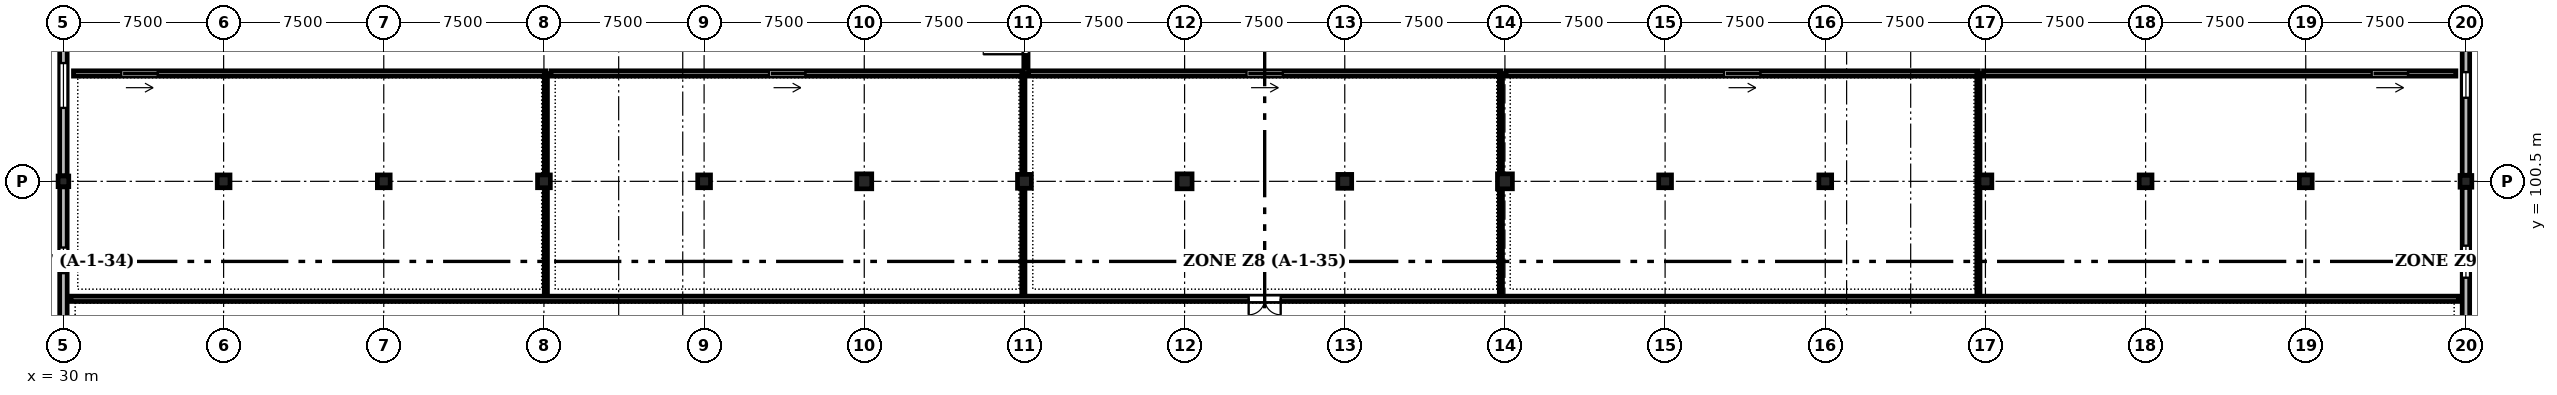
"""IFC4 building model, lengths in metres.
Left out: names, types, materials, properties, quantities, classifications, styles, units other than length and angle.
Written with IfcOpenShell. Run it as: python <this file> out.ifc"""

import sys

from ifc_helpers import new_model, si_unit, direction, frame, frame_2d, origin, origin_2d, place, context, subcontext, project, spatial, rectangle, circle, extrude, element, fill, save


model = new_model("IFC4")
c1 = context("Model", 3, precision=1e-05, world=origin(), true_north=direction((0.0, 1.0)))
c2 = subcontext(c1, "Body", "Model", "MODEL_VIEW")
j1 = project(units=[si_unit("LENGTHUNIT", "METRE"), si_unit("PLANEANGLEUNIT", "RADIAN")], contexts=[c1])
p1 = place(None, origin())
s1 = spatial("IfcSite", under=j1, at=p1, CompositionType="ELEMENT")
p2 = place(p1, origin())
s2 = spatial("IfcBuilding", under=s1, at=p2, CompositionType="ELEMENT")
p3 = place(p2, frame((0.0, 0.0, 9.3)))
s3 = spatial("IfcBuildingStorey", under=s2, at=p3, CompositionType="ELEMENT", Elevation=9.3)
p4 = place(p3, frame((30.0, 100.5, 0.0), z_axis=(0.0, 0.0, 1.0), x_axis=(1.0, 0.0, 0.0)))
e1 = element("IfcColumn", 1, at=p4, inside=s3, PredefinedType="COLUMN", context=c2, shape_type="SweptSolid", body=[
    extrude(rectangle(XDim=0.5, YDim=0.5, at=origin_2d()), origin(), (0.0, 0.0, 1.0), 4.8),
])
p5 = place(p3, frame((37.5, 100.5, 0.0), z_axis=(0.0, 0.0, 1.0), x_axis=(1.0, 0.0, 0.0)))
e2 = element("IfcColumn", 2, at=p5, inside=s3, PredefinedType="COLUMN", context=c2, shape_type="SweptSolid", body=[
    extrude(circle(Radius=0.3, at=origin_2d()), origin(), (0.0, 0.0, 1.0), 4.8),
])
for number, where, z_axis, x_axis in (
    (3, (45.0, 100.5, 0.0), (0.0, 0.0, 1.0), (1.0, 0.0, 0.0)),
    (4, (52.5, 100.5, 0.0), (0.0, 0.0, 1.0), (1.0, 0.0, 0.0)),
):
    element("IfcColumn", number, at=place(p3, frame(where, z_axis=z_axis, x_axis=x_axis)), inside=s3, PredefinedType="COLUMN", context=c2, shape_type="SweptSolid", body=[
        extrude(rectangle(XDim=0.6, YDim=0.6, at=origin_2d()), origin(), (0.0, 0.0, 1.0), 4.8),
    ])
p6 = place(p3, frame((60.0, 100.5, 0.0), z_axis=(0.0, 0.0, 1.0), x_axis=(1.0, 0.0, 0.0)))
e5 = element("IfcColumn", 5, at=p6, inside=s3, PredefinedType="COLUMN", context=c2, shape_type="SweptSolid", body=[
    extrude(circle(Radius=0.3, at=origin_2d()), origin(), (0.0, 0.0, 1.0), 4.8),
])
p7 = place(p3, frame((67.5, 100.5, 0.0), z_axis=(0.0, 0.0, 1.0), x_axis=(1.0, 0.0, 0.0)))
e6 = element("IfcColumn", 6, at=p7, inside=s3, PredefinedType="COLUMN", context=c2, shape_type="SweptSolid", body=[
    extrude(rectangle(XDim=0.7, YDim=0.7, at=origin_2d()), origin(), (0.0, 0.0, 1.0), 4.8),
])
p8 = place(p3, frame((75.0, 100.5, 0.0), z_axis=(0.0, 0.0, 1.0), x_axis=(1.0, 0.0, 0.0)))
e7 = element("IfcColumn", 7, at=p8, inside=s3, PredefinedType="COLUMN", context=c2, shape_type="SweptSolid", body=[
    extrude(rectangle(XDim=0.65, YDim=0.65, at=origin_2d()), origin(), (0.0, 0.0, 1.0), 4.8),
])
p9 = place(p3, frame((82.5, 100.5, 0.0), z_axis=(0.0, 0.0, 1.0), x_axis=(1.0, 0.0, 0.0)))
e8 = element("IfcColumn", 8, at=p9, inside=s3, PredefinedType="COLUMN", context=c2, shape_type="SweptSolid", body=[
    extrude(rectangle(XDim=0.7, YDim=0.7, at=origin_2d()), origin(), (0.0, 0.0, 1.0), 4.8),
])
p10 = place(p3, frame((90.0, 100.5, 0.0), z_axis=(0.0, 0.0, 1.0), x_axis=(1.0, 0.0, 0.0)))
e9 = element("IfcColumn", 9, at=p10, inside=s3, PredefinedType="COLUMN", context=c2, shape_type="SweptSolid", body=[
    extrude(rectangle(XDim=0.65, YDim=0.65, at=origin_2d()), origin(), (0.0, 0.0, 1.0), 4.8),
])
p11 = place(p3, frame((97.5, 100.5, 0.0), z_axis=(0.0, 0.0, 1.0), x_axis=(1.0, 0.0, 0.0)))
e10 = element("IfcColumn", 10, at=p11, inside=s3, PredefinedType="COLUMN", context=c2, shape_type="SweptSolid", body=[
    extrude(rectangle(XDim=0.7, YDim=0.7, at=origin_2d()), origin(), (0.0, 0.0, 1.0), 4.8),
])
p12 = place(p3, frame((105.0, 100.5, 0.0), z_axis=(0.0, 0.0, 1.0), x_axis=(1.0, 0.0, 0.0)))
e11 = element("IfcColumn", 11, at=p12, inside=s3, PredefinedType="COLUMN", context=c2, shape_type="SweptSolid", body=[
    extrude(circle(Radius=0.3, at=origin_2d()), origin(), (0.0, 0.0, 1.0), 4.8),
])
for number, where, z_axis, x_axis in (
    (12, (112.5, 100.5, 0.0), (0.0, 0.0, 1.0), (1.0, 0.0, 0.0)),
    (13, (120.0, 100.5, 0.0), (0.0, 0.0, 1.0), (1.0, 0.0, 0.0)),
):
    element("IfcColumn", number, at=place(p3, frame(where, z_axis=z_axis, x_axis=x_axis)), inside=s3, PredefinedType="COLUMN", context=c2, shape_type="SweptSolid", body=[
        extrude(rectangle(XDim=0.6, YDim=0.6, at=origin_2d()), origin(), (0.0, 0.0, 1.0), 4.8),
    ])
p13 = place(p3, frame((127.5, 100.5, 0.0), z_axis=(0.0, 0.0, 1.0), x_axis=(1.0, 0.0, 0.0)))
e14 = element("IfcColumn", 14, at=p13, inside=s3, PredefinedType="COLUMN", context=c2, shape_type="SweptSolid", body=[
    extrude(circle(Radius=0.3, at=origin_2d()), origin(), (0.0, 0.0, 1.0), 4.8),
])
p14 = place(p3, frame((135.0, 100.5, 0.0), z_axis=(0.0, 0.0, 1.0), x_axis=(1.0, 0.0, 0.0)))
e15 = element("IfcColumn", 15, at=p14, inside=s3, PredefinedType="COLUMN", context=c2, shape_type="SweptSolid", body=[
    extrude(rectangle(XDim=0.6, YDim=0.6, at=origin_2d()), origin(), (0.0, 0.0, 1.0), 4.8),
])
p15 = place(p3, frame((142.5, 100.5, 0.0), z_axis=(0.0, 0.0, 1.0), x_axis=(1.0, 0.0, 0.0)))
e16 = element("IfcColumn", 16, at=p15, inside=s3, PredefinedType="COLUMN", context=c2, shape_type="SweptSolid", body=[
    extrude(rectangle(XDim=0.55, YDim=0.55, at=origin_2d()), origin(), (0.0, 0.0, 1.0), 4.8),
])
p16 = place(p3, frame((30.0, 93.36, 0.0), z_axis=(0.0, 0.0, 1.0), x_axis=(0.0, 1.0, 0.0)))
e17 = element("IfcWall", 17, at=p16, inside=s3, PredefinedType="STANDARD", context=c2, shape_type="SweptSolid", body=[
    extrude(rectangle(XDim=6.88, YDim=0.35, at=frame_2d((3.44, 0.0))), origin(), (0.0, 0.0, 1.0), 3.95),
])
p17 = place(p16, frame((2.84, 0.0, 0.9)))
e18 = element("IfcOpeningElement", 18, at=p17, cuts=e17, PredefinedType="OPENING", context=c2, shape_type="SweptSolid", body=[
    extrude(rectangle(XDim=1.2, YDim=2.1, at=frame_2d((0.6, 1.05))), frame((0.0, 0.185, 0.0), z_axis=(0.0, -1.0, 0.0), x_axis=(1.0, 0.0, 0.0)), (0.0, 0.0, 1.0), 0.37),
])
p18 = place(p3, frame((30.0, 100.76, 0.0), z_axis=(0.0, 0.0, 1.0), x_axis=(0.0, 1.0, 0.0)))
e19 = element("IfcWall", 19, at=p18, inside=s3, PredefinedType="STANDARD", context=c2, shape_type="SweptSolid", body=[
    extrude(rectangle(XDim=8.455, YDim=0.35, at=frame_2d((4.228, 0.0))), origin(), (0.0, 0.0, 1.0), 4.0),
])
p19 = place(p18, frame((3.177, 0.0, 0.9)))
e20 = element("IfcOpeningElement", 20, at=p19, cuts=e19, PredefinedType="OPENING", context=c2, shape_type="SweptSolid", body=[
    extrude(rectangle(XDim=2.1, YDim=2.1, at=frame_2d((1.05, 1.05))), frame((0.0, 0.185, 0.0), z_axis=(0.0, -1.0, 0.0), x_axis=(1.0, 0.0, 0.0)), (0.0, 0.0, 1.0), 0.37),
])
p20 = place(p3, frame((142.5, 100.215, 0.0), z_axis=(0.0, 0.0, 1.0), x_axis=(0.0, -1.0, 0.0)))
e21 = element("IfcWall", 21, at=p20, inside=s3, PredefinedType="STANDARD", context=c2, shape_type="SweptSolid", body=[
    extrude(rectangle(XDim=6.955, YDim=0.35, at=frame_2d((3.478, 0.0))), origin(), (0.0, 0.0, 1.0), 3.95),
])
p21 = place(p20, frame((2.728, 0.0, 0.9)))
e22 = element("IfcOpeningElement", 22, at=p21, cuts=e21, PredefinedType="OPENING", context=c2, shape_type="SweptSolid", body=[
    extrude(rectangle(XDim=1.5, YDim=2.1, at=frame_2d((0.75, 1.05))), frame((0.0, 0.185, 0.0), z_axis=(0.0, -1.0, 0.0), x_axis=(1.0, 0.0, 0.0)), (0.0, 0.0, 1.0), 0.37),
])
p22 = place(p3, frame((142.5, 109.24, 0.0), z_axis=(0.0, 0.0, 1.0), x_axis=(0.0, -1.0, 0.0)))
e23 = element("IfcWall", 23, at=p22, inside=s3, PredefinedType="STANDARD", context=c2, shape_type="SweptSolid", body=[
    extrude(rectangle(XDim=8.455, YDim=0.35, at=frame_2d((4.228, 0.0))), origin(), (0.0, 0.0, 1.0), 4.0),
])
p23 = place(p22, frame((3.627, 0.0, 0.9)))
e24 = element("IfcOpeningElement", 24, at=p23, cuts=e23, PredefinedType="OPENING", context=c2, shape_type="SweptSolid", body=[
    extrude(rectangle(XDim=1.2, YDim=2.1, at=frame_2d((0.6, 1.05))), frame((0.0, 0.185, 0.0), z_axis=(0.0, -1.0, 0.0), x_axis=(1.0, 0.0, 0.0)), (0.0, 0.0, 1.0), 0.37),
])
p24 = place(p3, frame((142.15, 95.0, 0.0), z_axis=(0.0, 0.0, 1.0), x_axis=(-1.0, 0.0, 0.0)))
e25 = element("IfcWall", 25, at=p24, inside=s3, PredefinedType="STANDARD", context=c2, shape_type="SweptSolid", body=[
    extrude(rectangle(XDim=111.8, YDim=0.25, at=frame_2d((55.9, 0.0))), origin(), (0.0, 0.0, 1.0), 4.535),
])
p25 = place(p24, frame((55.15, 0.0, 0.0)))
e26 = element("IfcOpeningElement", 26, at=p25, cuts=e25, PredefinedType="OPENING", context=c2, shape_type="SweptSolid", body=[
    extrude(rectangle(XDim=1.5, YDim=2.3, at=frame_2d((0.75, 1.15))), frame((0.0, 0.135, 0.0), z_axis=(0.0, -1.0, 0.0), x_axis=(1.0, 0.0, 0.0)), (0.0, 0.0, 1.0), 0.27),
])
p26 = place(p3, frame((52.59, 105.55, 0.0), z_axis=(0.0, 0.0, 1.0), x_axis=(-1.0, 0.0, 0.0)))
e27 = element("IfcWall", 27, at=p26, inside=s3, PredefinedType="STANDARD", context=c2, shape_type="SweptSolid", body=[
    extrude(rectangle(XDim=22.12, YDim=0.25, at=frame_2d((11.06, 0.0))), origin(), (0.0, 0.0, 1.0), 4.535),
])
p27 = place(p26, frame((18.178, 0.0, 0.0)))
e28 = element("IfcOpeningElement", 28, at=p27, cuts=e27, PredefinedType="OPENING", context=c2, shape_type="SweptSolid", body=[
    extrude(rectangle(XDim=1.7, YDim=2.4, at=frame_2d((0.85, 1.2))), frame((0.0, 0.135, 0.0), z_axis=(0.0, -1.0, 0.0), x_axis=(1.0, 0.0, 0.0)), (0.0, 0.0, 1.0), 0.27),
])
p28 = place(p3, frame((74.95, 105.55, 0.0), z_axis=(0.0, 0.0, 1.0), x_axis=(-1.0, 0.0, 0.0)))
e29 = element("IfcWall", 29, at=p28, inside=s3, PredefinedType="STANDARD", context=c2, shape_type="SweptSolid", body=[
    extrude(rectangle(XDim=22.12, YDim=0.25, at=frame_2d((11.06, 0.0))), origin(), (0.0, 0.0, 1.0), 4.535),
])
p29 = place(p28, frame((10.21, 0.0, 0.0)))
e30 = element("IfcOpeningElement", 30, at=p29, cuts=e29, PredefinedType="OPENING", context=c2, shape_type="SweptSolid", body=[
    extrude(rectangle(XDim=1.7, YDim=2.4, at=frame_2d((0.85, 1.2))), frame((0.0, 0.135, 0.0), z_axis=(0.0, -1.0, 0.0), x_axis=(1.0, 0.0, 0.0)), (0.0, 0.0, 1.0), 0.27),
])
p30 = place(p3, frame((97.31, 105.55, 0.0), z_axis=(0.0, 0.0, 1.0), x_axis=(-1.0, 0.0, 0.0)))
e31 = element("IfcWall", 31, at=p30, inside=s3, PredefinedType="STANDARD", context=c2, shape_type="SweptSolid", body=[
    extrude(rectangle(XDim=22.12, YDim=0.25, at=frame_2d((11.06, 0.0))), origin(), (0.0, 0.0, 1.0), 4.535),
])
p31 = place(p30, frame((10.21, 0.0, 0.0)))
e32 = element("IfcOpeningElement", 32, at=p31, cuts=e31, PredefinedType="OPENING", context=c2, shape_type="SweptSolid", body=[
    extrude(rectangle(XDim=1.7, YDim=2.4, at=frame_2d((0.85, 1.2))), frame((0.0, 0.135, 0.0), z_axis=(0.0, -1.0, 0.0), x_axis=(1.0, 0.0, 0.0)), (0.0, 0.0, 1.0), 0.27),
])
p32 = place(p3, frame((119.67, 105.55, 0.0), z_axis=(0.0, 0.0, 1.0), x_axis=(-1.0, 0.0, 0.0)))
e33 = element("IfcWall", 33, at=p32, inside=s3, PredefinedType="STANDARD", context=c2, shape_type="SweptSolid", body=[
    extrude(rectangle(XDim=22.12, YDim=0.25, at=frame_2d((11.06, 0.0))), origin(), (0.0, 0.0, 1.0), 4.535),
])
p33 = place(p32, frame((10.21, 0.0, 0.0)))
e34 = element("IfcOpeningElement", 34, at=p33, cuts=e33, PredefinedType="OPENING", context=c2, shape_type="SweptSolid", body=[
    extrude(rectangle(XDim=1.7, YDim=2.4, at=frame_2d((0.85, 1.2))), frame((0.0, 0.135, 0.0), z_axis=(0.0, -1.0, 0.0), x_axis=(1.0, 0.0, 0.0)), (0.0, 0.0, 1.0), 0.27),
])
p34 = place(p3, frame((142.03, 105.55, 0.0), z_axis=(0.0, 0.0, 1.0), x_axis=(-1.0, 0.0, 0.0)))
e35 = element("IfcWall", 35, at=p34, inside=s3, PredefinedType="STANDARD", context=c2, shape_type="SweptSolid", body=[
    extrude(rectangle(XDim=22.12, YDim=0.25, at=frame_2d((11.06, 0.0))), origin(), (0.0, 0.0, 1.0), 4.535),
])
p35 = place(p34, frame((2.242, 0.0, 0.0)))
e36 = element("IfcOpeningElement", 36, at=p35, cuts=e35, PredefinedType="OPENING", context=c2, shape_type="SweptSolid", body=[
    extrude(rectangle(XDim=1.7, YDim=2.4, at=frame_2d((0.85, 1.2))), frame((0.0, 0.135, 0.0), z_axis=(0.0, -1.0, 0.0), x_axis=(1.0, 0.0, 0.0)), (0.0, 0.0, 1.0), 0.27),
])
for number, where, z_axis, x_axis in (
    (37, (52.59, 95.25, 0.0), (0.0, 0.0, 1.0), (0.0, 1.0, 0.0)),
    (38, (74.95, 95.25, 0.0), (0.0, 0.0, 1.0), (0.0, 1.0, 0.0)),
    (39, (97.31, 95.25, 0.0), (0.0, 0.0, 1.0), (0.0, 1.0, 0.0)),
    (40, (119.67, 95.25, 0.0), (0.0, 0.0, 1.0), (0.0, 1.0, 0.0)),
):
    element("IfcWall", number, at=place(p3, frame(where, z_axis=z_axis, x_axis=x_axis)), inside=s3, PredefinedType="PARTITIONING", context=c2, shape_type="SweptSolid", body=[
        extrude(rectangle(XDim=10.3, YDim=0.15, at=frame_2d((5.15, 0.0))), origin(), (0.0, 0.0, 1.0), 3.835),
    ])
p36 = place(p3, frame((75.07, 105.8, 0.0), z_axis=(0.0, 0.0, 1.0), x_axis=(0.0, 1.0, 0.0)))
e41 = element("IfcWall", 41, at=p36, inside=s3, PredefinedType="STANDARD", context=c2, shape_type="SweptSolid", body=[
    extrude(rectangle(XDim=3.3, YDim=0.2, at=frame_2d((1.65, 0.0))), origin(), (0.0, 0.0, 1.0), 3.835),
])
p37 = place(p36, frame((0.65, 0.0, 0.0)))
e42 = element("IfcOpeningElement", 42, at=p37, cuts=e41, PredefinedType="OPENING", context=c2, shape_type="SweptSolid", body=[
    extrude(rectangle(XDim=2.0, YDim=2.3, at=frame_2d((1.0, 1.15))), frame((0.0, 0.11, 0.0), z_axis=(0.0, -1.0, 0.0), x_axis=(1.0, 0.0, 0.0)), (0.0, 0.0, 1.0), 0.22),
])
p38 = place(p17, origin())
e43 = element("IfcWindow", 43, at=p38, inside=s3, PartitioningType="SINGLE_PANEL", PredefinedType="WINDOW", context=c2, shape_type="SweptSolid", body=[
    extrude(rectangle(XDim=1.2, YDim=2.1, at=frame_2d((0.6, 1.05))), frame((0.0, 0.03, 0.0), z_axis=(0.0, -1.0, 0.0), x_axis=(1.0, 0.0, 0.0)), (0.0, 0.0, 1.0), 0.06),
])
fill(e18, e43)
p39 = place(p19, origin())
e44 = element("IfcWindow", 44, at=p39, inside=s3, PartitioningType="SINGLE_PANEL", PredefinedType="WINDOW", context=c2, shape_type="SweptSolid", body=[
    extrude(rectangle(XDim=2.1, YDim=2.1, at=frame_2d((1.05, 1.05))), frame((0.0, 0.03, 0.0), z_axis=(0.0, -1.0, 0.0), x_axis=(1.0, 0.0, 0.0)), (0.0, 0.0, 1.0), 0.06),
])
fill(e20, e44)
p40 = place(p21, origin())
e45 = element("IfcWindow", 45, at=p40, inside=s3, PartitioningType="SINGLE_PANEL", PredefinedType="WINDOW", context=c2, shape_type="SweptSolid", body=[
    extrude(rectangle(XDim=1.5, YDim=2.1, at=frame_2d((0.75, 1.05))), frame((0.0, 0.03, 0.0), z_axis=(0.0, -1.0, 0.0), x_axis=(1.0, 0.0, 0.0)), (0.0, 0.0, 1.0), 0.06),
])
fill(e22, e45)
p41 = place(p23, origin())
e46 = element("IfcWindow", 46, at=p41, inside=s3, PartitioningType="SINGLE_PANEL", PredefinedType="WINDOW", context=c2, shape_type="SweptSolid", body=[
    extrude(rectangle(XDim=1.2, YDim=2.1, at=frame_2d((0.6, 1.05))), frame((0.0, 0.03, 0.0), z_axis=(0.0, -1.0, 0.0), x_axis=(1.0, 0.0, 0.0)), (0.0, 0.0, 1.0), 0.06),
])
fill(e24, e46)
p42 = place(p25, origin())
e47 = element("IfcDoor", 47, at=p42, inside=s3, OperationType="DOUBLE_DOOR_SINGLE_SWING", PredefinedType="DOOR", context=c2, shape_type="SweptSolid", body=[
    extrude(rectangle(XDim=1.5, YDim=2.3, at=frame_2d((0.75, 1.15))), frame((0.0, 0.025, 0.0), z_axis=(0.0, -1.0, 0.0), x_axis=(1.0, 0.0, 0.0)), (0.0, 0.0, 1.0), 0.05),
])
fill(e26, e47)
p43 = place(p27, origin())
e48 = element("IfcDoor", 48, at=p43, inside=s3, OperationType="DOUBLE_DOOR_SLIDING", PredefinedType="DOOR", context=c2, shape_type="SweptSolid", body=[
    extrude(rectangle(XDim=1.7, YDim=2.4, at=frame_2d((0.85, 1.2))), frame((0.0, 0.025, 0.0), z_axis=(0.0, -1.0, 0.0), x_axis=(1.0, 0.0, 0.0)), (0.0, 0.0, 1.0), 0.05),
])
fill(e28, e48)
p44 = place(p29, origin())
e49 = element("IfcDoor", 49, at=p44, inside=s3, OperationType="DOUBLE_DOOR_SLIDING", PredefinedType="DOOR", context=c2, shape_type="SweptSolid", body=[
    extrude(rectangle(XDim=1.7, YDim=2.4, at=frame_2d((0.85, 1.2))), frame((0.0, 0.025, 0.0), z_axis=(0.0, -1.0, 0.0), x_axis=(1.0, 0.0, 0.0)), (0.0, 0.0, 1.0), 0.05),
])
fill(e30, e49)
p45 = place(p31, origin())
e50 = element("IfcDoor", 50, at=p45, inside=s3, OperationType="DOUBLE_DOOR_SLIDING", PredefinedType="DOOR", context=c2, shape_type="SweptSolid", body=[
    extrude(rectangle(XDim=1.7, YDim=2.4, at=frame_2d((0.85, 1.2))), frame((0.0, 0.025, 0.0), z_axis=(0.0, -1.0, 0.0), x_axis=(1.0, 0.0, 0.0)), (0.0, 0.0, 1.0), 0.05),
])
fill(e32, e50)
p46 = place(p33, origin())
e51 = element("IfcDoor", 51, at=p46, inside=s3, OperationType="DOUBLE_DOOR_SLIDING", PredefinedType="DOOR", context=c2, shape_type="SweptSolid", body=[
    extrude(rectangle(XDim=1.7, YDim=2.4, at=frame_2d((0.85, 1.2))), frame((0.0, 0.025, 0.0), z_axis=(0.0, -1.0, 0.0), x_axis=(1.0, 0.0, 0.0)), (0.0, 0.0, 1.0), 0.05),
])
fill(e34, e51)
p47 = place(p35, origin())
e52 = element("IfcDoor", 52, at=p47, inside=s3, OperationType="DOUBLE_DOOR_SLIDING", PredefinedType="DOOR", context=c2, shape_type="SweptSolid", body=[
    extrude(rectangle(XDim=1.7, YDim=2.4, at=frame_2d((0.85, 1.2))), frame((0.0, 0.025, 0.0), z_axis=(0.0, -1.0, 0.0), x_axis=(1.0, 0.0, 0.0)), (0.0, 0.0, 1.0), 0.05),
])
fill(e36, e52)
p48 = place(p37, origin())
e53 = element("IfcDoor", 53, at=p48, inside=s3, OperationType="DOUBLE_DOOR_SINGLE_SWING", PredefinedType="DOOR", context=c2, shape_type="SweptSolid", body=[
    extrude(rectangle(XDim=2.0, YDim=2.3, at=frame_2d((1.0, 1.15))), frame((0.0, 0.025, 0.0), z_axis=(0.0, -1.0, 0.0), x_axis=(1.0, 0.0, 0.0)), (0.0, 0.0, 1.0), 0.05),
])
fill(e42, e53)
save(model, sys.argv[1])
